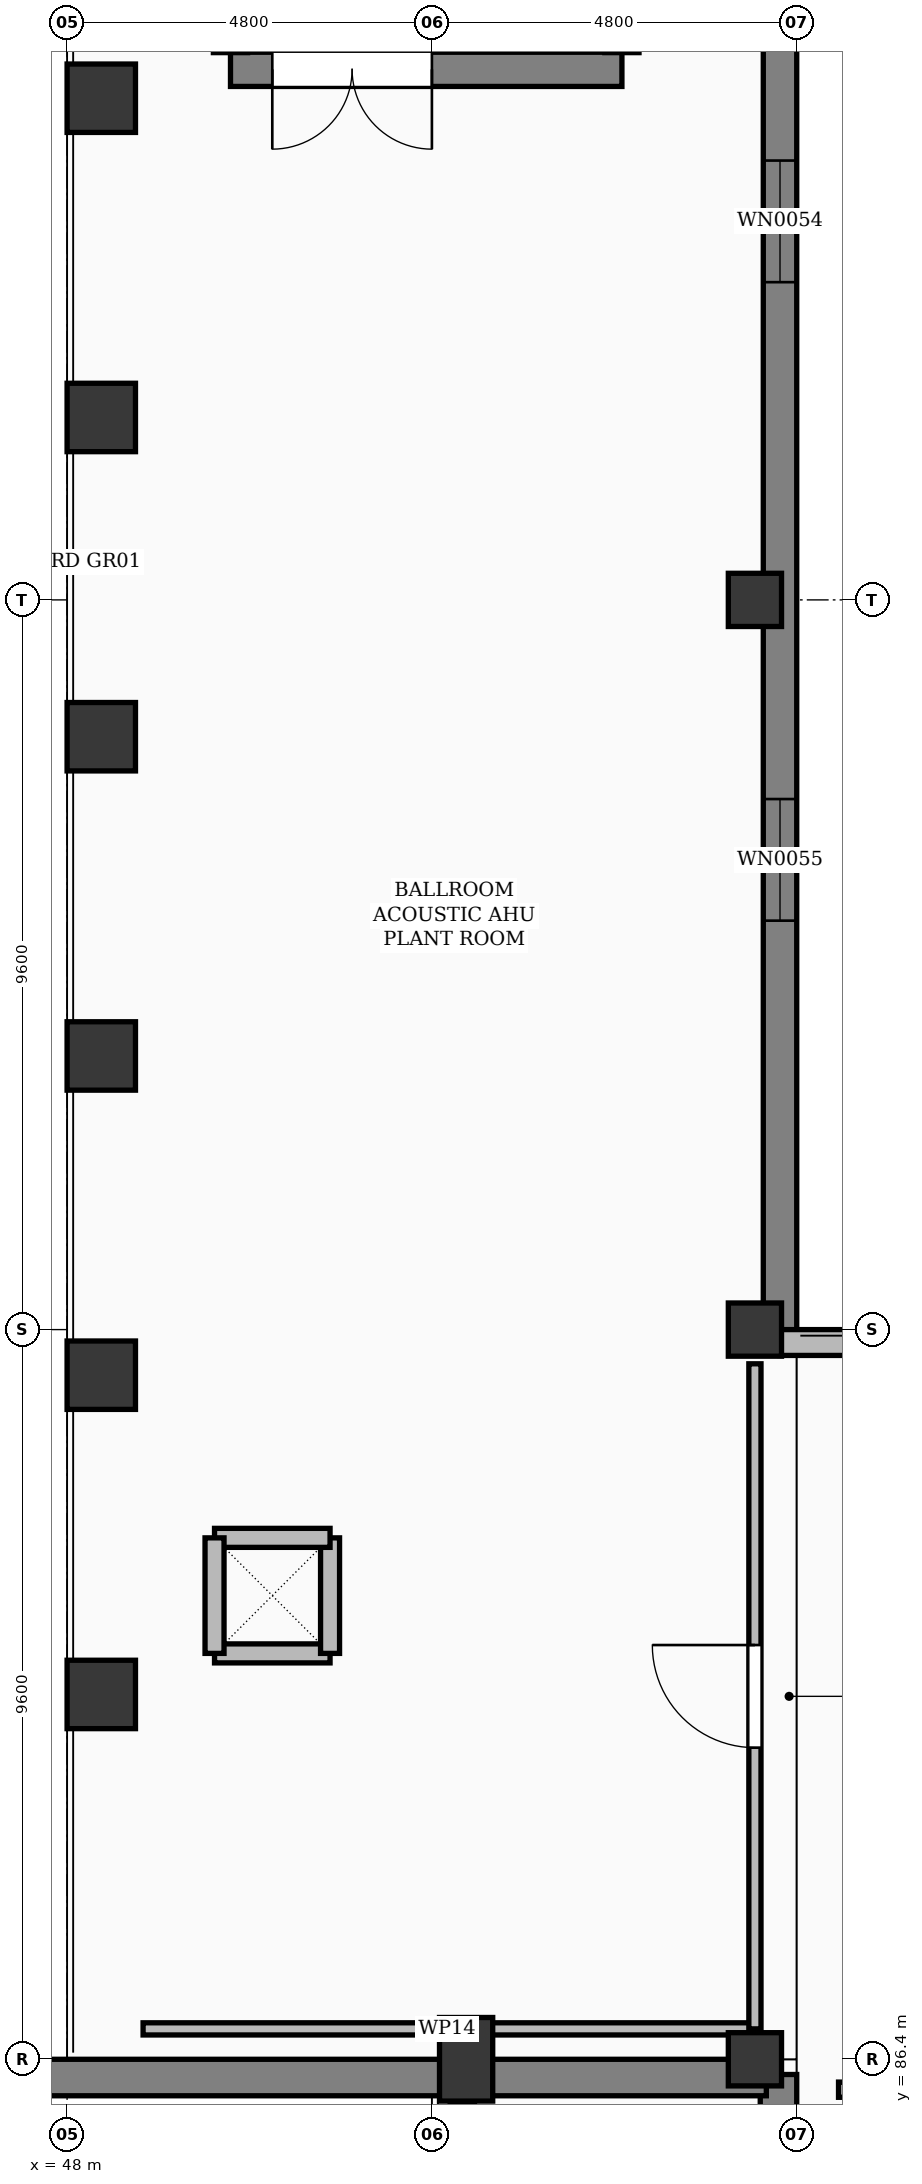
"""IFC4 building model, lengths in metres.
Left out: names, types, materials, properties, quantities, classifications, styles, units other than length and angle.
Written with IfcOpenShell. Run it as: python <this file> out.ifc"""

import sys

from ifc_helpers import new_model, si_unit, direction, frame, frame_2d, origin, origin_2d, place, context, subcontext, project, spatial, rectangle, extrude, element, fill, save


model = new_model("IFC4")
c1 = context("Model", 3, precision=1e-05, world=origin(), true_north=direction((0.0, 1.0)))
c2 = subcontext(c1, "Body", "Model", "MODEL_VIEW")
j1 = project(units=[si_unit("LENGTHUNIT", "METRE"), si_unit("PLANEANGLEUNIT", "RADIAN")], contexts=[c1])
p1 = place(None, origin())
s1 = spatial("IfcSite", under=j1, at=p1, CompositionType="ELEMENT")
p2 = place(p1, origin())
s2 = spatial("IfcBuilding", under=s1, at=p2, CompositionType="ELEMENT")
p3 = place(p2, frame((0.0, 0.0, 6.0)))
s3 = spatial("IfcBuildingStorey", under=s2, at=p3, CompositionType="ELEMENT", Elevation=6.0)
p4 = place(p3, frame((57.05, 86.4, 0.0), z_axis=(0.0, 0.0, 1.0), x_axis=(1.0, 0.0, 0.0)))
e1 = element("IfcColumn", 1, at=p4, inside=s3, PredefinedType="COLUMN", context=c2, shape_type="SweptSolid", body=[
    extrude(rectangle(XDim=0.7, YDim=0.7, at=origin_2d()), origin(), (0.0, 0.0, 1.0), 5.4),
])
p5 = place(p3, frame((53.25, 86.4, 0.0), z_axis=(0.0, 0.0, 1.0), x_axis=(1.0, 0.0, 0.0)))
e2 = element("IfcColumn", 2, at=p5, inside=s3, PredefinedType="COLUMN", context=c2, shape_type="SweptSolid", body=[
    extrude(rectangle(XDim=0.7, YDim=1.1, at=origin_2d()), origin(), (0.0, 0.0, 1.0), 5.4),
])
for number, where, z_axis, x_axis in (
    (3, (48.45, 91.2, 0.0), (0.0, 0.0, 1.0), (1.0, 0.0, 0.0)),
    (4, (48.45, 95.4, 0.0), (0.0, 0.0, 1.0), (1.0, 0.0, 0.0)),
    (5, (48.45, 99.6, 0.0), (0.0, 0.0, 1.0), (1.0, 0.0, 0.0)),
    (6, (48.45, 103.8, 0.0), (0.0, 0.0, 1.0), (1.0, 0.0, 0.0)),
    (7, (48.45, 108.0, 0.0), (0.0, 0.0, 1.0), (1.0, 0.0, 0.0)),
    (8, (48.45, 112.2, 0.0), (0.0, 0.0, 1.0), (1.0, 0.0, 0.0)),
):
    element("IfcColumn", number, at=place(p3, frame(where, z_axis=z_axis, x_axis=x_axis)), inside=s3, PredefinedType="COLUMN", context=c2, shape_type="SweptSolid", body=[
        extrude(rectangle(XDim=0.9, YDim=0.9, at=origin_2d()), origin(), (0.0, 0.0, 1.0), 6.65),
    ])
for number, where, z_axis, x_axis in (
    (9, (57.05, 96.0, 0.0), (0.0, 0.0, 1.0), (1.0, 0.0, 0.0)),
    (10, (57.05, 105.6, 0.0), (0.0, 0.0, 1.0), (1.0, 0.0, 0.0)),
):
    element("IfcColumn", number, at=place(p3, frame(where, z_axis=z_axis, x_axis=x_axis)), inside=s3, PredefinedType="COLUMN", context=c2, shape_type="SweptSolid", body=[
        extrude(rectangle(XDim=0.7, YDim=0.7, at=origin_2d()), origin(), (0.0, 0.0, 1.0), 5.4),
    ])
p6 = place(p3, frame((57.36, 86.2, 0.0), z_axis=(0.0, 0.0, 1.0), x_axis=(0.0, -1.0, 0.0)))
e11 = element("IfcWall", 11, at=p6, inside=s3, PredefinedType="SOLIDWALL", context=c2, shape_type="SweptSolid", body=[
    extrude(rectangle(XDim=52.6, YDim=0.48, at=frame_2d((26.3, 0.0))), origin(), (0.0, 0.0, 1.0), 5.4),
])
p7 = place(p6, frame((11.3, 0.0, 1.0)))
e12 = element("IfcOpeningElement", 12, at=p7, cuts=e11, PredefinedType="OPENING", context=c2, shape_type="SweptSolid", body=[
    extrude(rectangle(XDim=2.2, YDim=1.6, at=frame_2d((1.1, 0.8))), frame((0.0, 0.252, 0.0), z_axis=(0.0, -1.0, 0.0), x_axis=(1.0, 0.0, 0.0)), (0.0, 0.0, 1.0), 0.504),
])
p8 = place(p6, frame((28.0, 0.0, 1.0)))
e13 = element("IfcOpeningElement", 13, at=p8, cuts=e11, PredefinedType="OPENING", context=c2, shape_type="SweptSolid", body=[
    extrude(rectangle(XDim=2.2, YDim=1.6, at=frame_2d((1.1, 0.8))), frame((0.0, 0.252, 0.0), z_axis=(0.0, -1.0, 0.0), x_axis=(1.0, 0.0, 0.0)), (0.0, 0.0, 1.0), 0.504),
])
p9 = place(p3, frame((0.5, 86.16, 0.0), z_axis=(0.0, 0.0, 1.0), x_axis=(1.0, 0.0, 0.0)))
e14 = element("IfcWall", 14, at=p9, inside=s3, PredefinedType="SOLIDWALL", context=c2, shape_type="SweptSolid", body=[
    extrude(rectangle(XDim=56.7, YDim=0.48, at=frame_2d((28.35, 0.0))), origin(), (0.0, 0.0, 1.0), 5.4),
])
p10 = place(p3, frame((57.38, 125.78, 0.0), z_axis=(0.0, 0.0, 1.0), x_axis=(0.0, -1.0, 0.0)))
e15 = element("IfcWall", 15, at=p10, inside=s3, PredefinedType="SOLIDWALL", context=c2, shape_type="SweptSolid", body=[
    extrude(rectangle(XDim=29.97, YDim=0.44, at=frame_2d((14.985, 0.0))), origin(), (0.0, 0.0, 1.0), 6.6),
])
p11 = place(p10, frame((6.0, 0.0, 1.4)))
e16 = element("IfcOpeningElement", 16, at=p11, cuts=e15, PredefinedType="OPENING", context=c2, shape_type="SweptSolid", body=[
    extrude(rectangle(XDim=1.6, YDim=2.8, at=frame_2d((0.8, 1.4))), frame((0.0, 0.232, 0.0), z_axis=(0.0, -1.0, 0.0), x_axis=(1.0, 0.0, 0.0)), (0.0, 0.0, 1.0), 0.464),
])
p12 = place(p10, frame((14.4, 0.0, 1.4)))
e17 = element("IfcOpeningElement", 17, at=p12, cuts=e15, PredefinedType="OPENING", context=c2, shape_type="SweptSolid", body=[
    extrude(rectangle(XDim=1.6, YDim=2.8, at=frame_2d((0.8, 1.4))), frame((0.0, 0.232, 0.0), z_axis=(0.0, -1.0, 0.0), x_axis=(1.0, 0.0, 0.0)), (0.0, 0.0, 1.0), 0.464),
])
p13 = place(p10, frame((22.8, 0.0, 1.4)))
e18 = element("IfcOpeningElement", 18, at=p13, cuts=e15, PredefinedType="OPENING", context=c2, shape_type="SweptSolid", body=[
    extrude(rectangle(XDim=1.6, YDim=2.8, at=frame_2d((0.8, 1.4))), frame((0.0, 0.232, 0.0), z_axis=(0.0, -1.0, 0.0), x_axis=(1.0, 0.0, 0.0)), (0.0, 0.0, 1.0), 0.464),
])
p14 = place(p3, frame((57.375, 95.83, 0.0), z_axis=(0.0, 0.0, 1.0), x_axis=(1.0, 0.0, 0.0)))
e19 = element("IfcWall", 19, at=p14, inside=s3, PredefinedType="SOLIDWALL", context=c2, shape_type="SweptSolid", body=[
    extrude(rectangle(XDim=9.825, YDim=0.34, at=frame_2d((4.913, 0.0))), origin(), (0.0, 0.0, 1.0), 4.312),
])
p15 = place(p14, frame((1.4, 0.0, 0.7)))
e20 = element("IfcOpeningElement", 20, at=p15, cuts=e19, PredefinedType="OPENING", context=c2, shape_type="SweptSolid", body=[
    extrude(rectangle(XDim=2.0, YDim=2.8, at=frame_2d((1.0, 1.4))), frame((0.0, 0.182, 0.0), z_axis=(0.0, -1.0, 0.0), x_axis=(1.0, 0.0, 0.0)), (0.0, 0.0, 1.0), 0.364),
])
p16 = place(p14, frame((5.0, 0.0, 0.7)))
e21 = element("IfcOpeningElement", 21, at=p16, cuts=e19, PredefinedType="OPENING", context=c2, shape_type="SweptSolid", body=[
    extrude(rectangle(XDim=2.0, YDim=2.8, at=frame_2d((1.0, 1.4))), frame((0.0, 0.182, 0.0), z_axis=(0.0, -1.0, 0.0), x_axis=(1.0, 0.0, 0.0)), (0.0, 0.0, 1.0), 0.364),
])
p17 = place(p3, frame((50.15, 112.58, 0.0), z_axis=(0.0, 0.0, 1.0), x_axis=(1.0, 0.0, 0.0)))
e22 = element("IfcWall", 22, at=p17, inside=s3, PredefinedType="SHEAR", context=c2, shape_type="SweptSolid", body=[
    extrude(rectangle(XDim=5.15, YDim=0.45, at=frame_2d((2.575, 0.0))), origin(), (0.0, 0.0, 1.0), 5.1),
])
p18 = place(p17, frame((0.55, 0.0, 0.0)))
e23 = element("IfcOpeningElement", 23, at=p18, cuts=e22, PredefinedType="OPENING", context=c2, shape_type="SweptSolid", body=[
    extrude(rectangle(XDim=2.1, YDim=2.2, at=frame_2d((1.05, 1.1))), frame((0.0, 0.237, 0.0), z_axis=(0.0, -1.0, 0.0), x_axis=(1.0, 0.0, 0.0)), (0.0, 0.0, 1.0), 0.474),
])
for number, where, z_axis, x_axis in (
    (24, (49.94, 91.74, 0.0), (0.0, 0.0, 1.0), (1.0, 0.0, 0.0)),
    (25, (51.46, 91.74, 0.0), (0.0, 0.0, 1.0), (0.0, 1.0, 0.0)),
    (26, (51.46, 93.26, 0.0), (0.0, 0.0, 1.0), (-1.0, 0.0, 0.0)),
    (27, (49.94, 93.26, 0.0), (0.0, 0.0, 1.0), (0.0, -1.0, 0.0)),
):
    element("IfcWall", number, at=place(p3, frame(where, z_axis=z_axis, x_axis=x_axis)), inside=s3, PredefinedType="SOLIDWALL", context=c2, shape_type="SweptSolid", body=[
        extrude(rectangle(XDim=1.52, YDim=0.25, at=frame_2d((0.76, 0.0))), origin(), (0.0, 0.0, 1.0), 5.1),
    ])
p19 = place(p3, frame((49.0, 86.8, 0.0), z_axis=(0.0, 0.0, 1.0), x_axis=(1.0, 0.0, 0.0)))
e28 = element("IfcWall", 28, at=p19, inside=s3, PredefinedType="PARTITIONING", context=c2, shape_type="SweptSolid", body=[
    extrude(rectangle(XDim=8.0, YDim=0.16, at=frame_2d((4.0, 0.0))), origin(), (0.0, 0.0, 1.0), 4.312),
])
p20 = place(p3, frame((57.05, 86.8, 0.0), z_axis=(0.0, 0.0, 1.0), x_axis=(0.0, 1.0, 0.0)))
e29 = element("IfcWall", 29, at=p20, inside=s3, PredefinedType="PARTITIONING", context=c2, shape_type="SweptSolid", body=[
    extrude(rectangle(XDim=8.75, YDim=0.16, at=frame_2d((4.375, 0.0))), origin(), (0.0, 0.0, 1.0), 4.312),
])
p21 = place(p20, frame((3.7, 0.0, 0.0)))
e30 = element("IfcOpeningElement", 30, at=p21, cuts=e29, PredefinedType="OPENING", context=c2, shape_type="SweptSolid", body=[
    extrude(rectangle(XDim=1.35, YDim=2.2, at=frame_2d((0.675, 1.1))), frame((0.0, 0.092, 0.0), z_axis=(0.0, -1.0, 0.0), x_axis=(1.0, 0.0, 0.0)), (0.0, 0.0, 1.0), 0.184),
])
p22 = place(p3, frame((58.15, 86.0, 0.0), z_axis=(0.0, 0.0, 1.0), x_axis=(1.0, 0.0, 0.0)))
e31 = element("IfcWall", 31, at=p22, inside=s3, PredefinedType="PARTITIONING", context=c2, shape_type="SweptSolid", body=[
    extrude(rectangle(XDim=15.9, YDim=0.2, at=frame_2d((7.95, 0.0))), origin(), (0.0, 0.0, 1.0), 5.1),
])
p23 = place(p12, origin())
e32 = element("IfcWindow", 32, at=p23, inside=s3, PartitioningType="SINGLE_PANEL", PredefinedType="WINDOW", context=c2, shape_type="SweptSolid", body=[
    extrude(rectangle(XDim=1.6, YDim=2.8, at=frame_2d((0.8, 1.4))), frame((0.0, 0.03, 0.0), z_axis=(0.0, -1.0, 0.0), x_axis=(1.0, 0.0, 0.0)), (0.0, 0.0, 1.0), 0.06),
])
fill(e17, e32)
p24 = place(p13, origin())
e33 = element("IfcWindow", 33, at=p24, inside=s3, PartitioningType="SINGLE_PANEL", PredefinedType="WINDOW", context=c2, shape_type="SweptSolid", body=[
    extrude(rectangle(XDim=1.6, YDim=2.8, at=frame_2d((0.8, 1.4))), frame((0.0, 0.03, 0.0), z_axis=(0.0, -1.0, 0.0), x_axis=(1.0, 0.0, 0.0)), (0.0, 0.0, 1.0), 0.06),
])
fill(e18, e33)
p25 = place(p18, frame((2.1, 0.0, 0.0), z_axis=(0.0, 0.0, 1.0), x_axis=(-1.0, 0.0, 0.0)))
e34 = element("IfcDoor", 34, at=p25, inside=s3, OperationType="DOUBLE_DOOR_SINGLE_SWING", PredefinedType="DOOR", context=c2, shape_type="SweptSolid", body=[
    extrude(rectangle(XDim=2.1, YDim=2.2, at=frame_2d((1.05, 1.1))), frame((0.0, 0.025, 0.0), z_axis=(0.0, -1.0, 0.0), x_axis=(1.0, 0.0, 0.0)), (0.0, 0.0, 1.0), 0.05),
])
fill(e23, e34)
p26 = place(p21, origin())
e35 = element("IfcDoor", 35, at=p26, inside=s3, OperationType="SINGLE_SWING_RIGHT", PredefinedType="DOOR", context=c2, shape_type="SweptSolid", body=[
    extrude(rectangle(XDim=1.35, YDim=2.2, at=frame_2d((0.675, 1.1))), frame((0.0, 0.025, 0.0), z_axis=(0.0, -1.0, 0.0), x_axis=(1.0, 0.0, 0.0)), (0.0, 0.0, 1.0), 0.05),
])
fill(e30, e35)
save(model, sys.argv[1])
